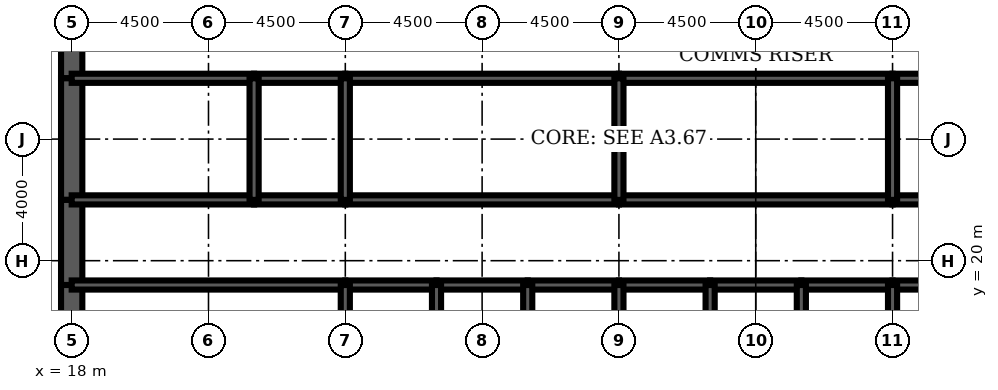
"""IFC4 building model, lengths in metres.
Left out: names, types, materials, properties, quantities, classifications, styles, units other than length and angle.
Written with IfcOpenShell. Run it as: python <this file> out.ifc"""

import sys

from ifc_helpers import new_model, si_unit, direction, frame, frame_2d, origin, place, context, subcontext, project, spatial, rectangle, extrude, element, fill, save


model = new_model("IFC4")
c1 = context("Model", 3, precision=1e-05, world=origin(), true_north=direction((0.0, 1.0)))
c2 = subcontext(c1, "Body", "Model", "MODEL_VIEW")
j1 = project(units=[si_unit("LENGTHUNIT", "METRE"), si_unit("PLANEANGLEUNIT", "RADIAN")], contexts=[c1])
p1 = place(None, origin())
s1 = spatial("IfcSite", under=j1, at=p1, CompositionType="ELEMENT")
p2 = place(p1, origin())
s2 = spatial("IfcBuilding", under=s1, at=p2, CompositionType="ELEMENT")
p3 = place(p2, frame((0.0, 0.0, 287.9)))
s3 = spatial("IfcBuildingStorey", under=s2, at=p3, CompositionType="ELEMENT", Elevation=287.9)
p4 = place(p3, frame((18.0, 28.8, 0.0), z_axis=(0.0, 0.0, 1.0), x_axis=(0.0, -1.0, 0.0)))
e1 = element("IfcWall", 1, at=p4, inside=s3, PredefinedType="SHEAR", context=c2, shape_type="SweptSolid", body=[
    extrude(rectangle(XDim=2.8, YDim=0.7, at=frame_2d((1.4, 0.0))), origin(), (0.0, 0.0, 1.0), 4.2),
])
p5 = place(p4, frame((0.4, 0.0, 0.0)))
e2 = element("IfcOpeningElement", 2, at=p5, cuts=e1, PredefinedType="OPENING", context=c2, shape_type="SweptSolid", body=[
    extrude(rectangle(XDim=1.8, YDim=2.1, at=frame_2d((0.9, 1.05))), frame((0.0, 0.36, 0.0), z_axis=(0.0, -1.0, 0.0), x_axis=(1.0, 0.0, 0.0)), (0.0, 0.0, 1.0), 0.72),
])
p6 = place(p3, frame((18.0, 26.0, 0.0), z_axis=(0.0, 0.0, 1.0), x_axis=(0.0, -1.0, 0.0)))
e3 = element("IfcWall", 3, at=p6, inside=s3, PredefinedType="SHEAR", context=c2, shape_type="SweptSolid", body=[
    extrude(rectangle(XDim=4.0, YDim=0.7, at=frame_2d((2.0, 0.0))), origin(), (0.0, 0.0, 1.0), 4.2),
])
p7 = place(p3, frame((18.0, 22.0, 0.0), z_axis=(0.0, 0.0, 1.0), x_axis=(0.0, -1.0, 0.0)))
e4 = element("IfcWall", 4, at=p7, inside=s3, PredefinedType="SHEAR", context=c2, shape_type="SweptSolid", body=[
    extrude(rectangle(XDim=2.8, YDim=0.7, at=frame_2d((1.4, 0.0))), origin(), (0.0, 0.0, 1.0), 4.2),
])
p8 = place(p7, frame((0.6, 0.0, 0.0)))
e5 = element("IfcOpeningElement", 5, at=p8, cuts=e4, PredefinedType="OPENING", context=c2, shape_type="SweptSolid", body=[
    extrude(rectangle(XDim=1.8, YDim=2.1, at=frame_2d((0.9, 1.05))), frame((0.0, 0.36, 0.0), z_axis=(0.0, -1.0, 0.0), x_axis=(1.0, 0.0, 0.0)), (0.0, 0.0, 1.0), 0.72),
])
p9 = place(p3, frame((18.0, 19.2, 0.0), z_axis=(0.0, 0.0, 1.0), x_axis=(0.0, -1.0, 0.0)))
e6 = element("IfcWall", 6, at=p9, inside=s3, PredefinedType="SHEAR", context=c2, shape_type="SweptSolid", body=[
    extrude(rectangle(XDim=3.2, YDim=0.7, at=frame_2d((1.6, 0.0))), origin(), (0.0, 0.0, 1.0), 4.2),
])
p10 = place(p3, frame((18.0, 19.2, 0.0), z_axis=(0.0, 0.0, 1.0), x_axis=(1.0, 0.0, 0.0)))
e7 = element("IfcWall", 7, at=p10, inside=s3, PredefinedType="SOLIDWALL", context=c2, shape_type="SweptSolid", body=[
    extrude(rectangle(XDim=9.0, YDim=0.3, at=frame_2d((4.5, 0.0))), origin(), (0.0, 0.0, 1.0), 4.2),
])
p11 = place(p10, frame((0.65, 0.0, 0.0)))
e8 = element("IfcOpeningElement", 8, at=p11, cuts=e7, PredefinedType="OPENING", context=c2, shape_type="SweptSolid", body=[
    extrude(rectangle(XDim=1.0, YDim=2.1, at=frame_2d((0.5, 1.05))), frame((0.0, 0.16, 0.0), z_axis=(0.0, -1.0, 0.0), x_axis=(1.0, 0.0, 0.0)), (0.0, 0.0, 1.0), 0.32),
])
p12 = place(p3, frame((27.0, 19.2, 0.0), z_axis=(0.0, 0.0, 1.0), x_axis=(1.0, 0.0, 0.0)))
e9 = element("IfcWall", 9, at=p12, inside=s3, PredefinedType="SOLIDWALL", context=c2, shape_type="SweptSolid", body=[
    extrude(rectangle(XDim=3.0, YDim=0.3, at=frame_2d((1.5, 0.0))), origin(), (0.0, 0.0, 1.0), 4.2),
])
p13 = place(p12, frame((0.95, 0.0, 0.0)))
e10 = element("IfcOpeningElement", 10, at=p13, cuts=e9, PredefinedType="OPENING", context=c2, shape_type="SweptSolid", body=[
    extrude(rectangle(XDim=1.1, YDim=2.2, at=frame_2d((0.55, 1.1))), frame((0.0, 0.16, 0.0), z_axis=(0.0, -1.0, 0.0), x_axis=(1.0, 0.0, 0.0)), (0.0, 0.0, 1.0), 0.32),
])
p14 = place(p3, frame((30.0, 19.2, 0.0), z_axis=(0.0, 0.0, 1.0), x_axis=(1.0, 0.0, 0.0)))
e11 = element("IfcWall", 11, at=p14, inside=s3, PredefinedType="SOLIDWALL", context=c2, shape_type="SweptSolid", body=[
    extrude(rectangle(XDim=3.0, YDim=0.3, at=frame_2d((1.5, 0.0))), origin(), (0.0, 0.0, 1.0), 4.2),
])
p15 = place(p14, frame((0.95, 0.0, 0.0)))
e12 = element("IfcOpeningElement", 12, at=p15, cuts=e11, PredefinedType="OPENING", context=c2, shape_type="SweptSolid", body=[
    extrude(rectangle(XDim=1.1, YDim=2.2, at=frame_2d((0.55, 1.1))), frame((0.0, 0.16, 0.0), z_axis=(0.0, -1.0, 0.0), x_axis=(1.0, 0.0, 0.0)), (0.0, 0.0, 1.0), 0.32),
])
p16 = place(p3, frame((33.0, 19.2, 0.0), z_axis=(0.0, 0.0, 1.0), x_axis=(1.0, 0.0, 0.0)))
e13 = element("IfcWall", 13, at=p16, inside=s3, PredefinedType="SOLIDWALL", context=c2, shape_type="SweptSolid", body=[
    extrude(rectangle(XDim=3.0, YDim=0.3, at=frame_2d((1.5, 0.0))), origin(), (0.0, 0.0, 1.0), 4.2),
])
p17 = place(p16, frame((0.95, 0.0, 0.0)))
e14 = element("IfcOpeningElement", 14, at=p17, cuts=e13, PredefinedType="OPENING", context=c2, shape_type="SweptSolid", body=[
    extrude(rectangle(XDim=1.1, YDim=2.2, at=frame_2d((0.55, 1.1))), frame((0.0, 0.16, 0.0), z_axis=(0.0, -1.0, 0.0), x_axis=(1.0, 0.0, 0.0)), (0.0, 0.0, 1.0), 0.32),
])
p18 = place(p3, frame((36.0, 19.2, 0.0), z_axis=(0.0, 0.0, 1.0), x_axis=(1.0, 0.0, 0.0)))
e15 = element("IfcWall", 15, at=p18, inside=s3, PredefinedType="SOLIDWALL", context=c2, shape_type="SweptSolid", body=[
    extrude(rectangle(XDim=3.0, YDim=0.3, at=frame_2d((1.5, 0.0))), origin(), (0.0, 0.0, 1.0), 4.2),
])
p19 = place(p18, frame((0.95, 0.0, 0.0)))
e16 = element("IfcOpeningElement", 16, at=p19, cuts=e15, PredefinedType="OPENING", context=c2, shape_type="SweptSolid", body=[
    extrude(rectangle(XDim=1.1, YDim=2.2, at=frame_2d((0.55, 1.1))), frame((0.0, 0.16, 0.0), z_axis=(0.0, -1.0, 0.0), x_axis=(1.0, 0.0, 0.0)), (0.0, 0.0, 1.0), 0.32),
])
p20 = place(p3, frame((39.0, 19.2, 0.0), z_axis=(0.0, 0.0, 1.0), x_axis=(1.0, 0.0, 0.0)))
e17 = element("IfcWall", 17, at=p20, inside=s3, PredefinedType="SOLIDWALL", context=c2, shape_type="SweptSolid", body=[
    extrude(rectangle(XDim=3.0, YDim=0.3, at=frame_2d((1.5, 0.0))), origin(), (0.0, 0.0, 1.0), 4.2),
])
p21 = place(p20, frame((1.0, 0.0, 0.0)))
e18 = element("IfcOpeningElement", 18, at=p21, cuts=e17, PredefinedType="OPENING", context=c2, shape_type="SweptSolid", body=[
    extrude(rectangle(XDim=1.0, YDim=2.1, at=frame_2d((0.5, 1.05))), frame((0.0, 0.16, 0.0), z_axis=(0.0, -1.0, 0.0), x_axis=(1.0, 0.0, 0.0)), (0.0, 0.0, 1.0), 0.32),
])
p22 = place(p3, frame((42.0, 19.2, 0.0), z_axis=(0.0, 0.0, 1.0), x_axis=(1.0, 0.0, 0.0)))
e19 = element("IfcWall", 19, at=p22, inside=s3, PredefinedType="SOLIDWALL", context=c2, shape_type="SweptSolid", body=[
    extrude(rectangle(XDim=3.0, YDim=0.3, at=frame_2d((1.5, 0.0))), origin(), (0.0, 0.0, 1.0), 4.2),
])
p23 = place(p22, frame((1.0, 0.0, 0.0)))
e20 = element("IfcOpeningElement", 20, at=p23, cuts=e19, PredefinedType="OPENING", context=c2, shape_type="SweptSolid", body=[
    extrude(rectangle(XDim=1.0, YDim=2.1, at=frame_2d((0.5, 1.05))), frame((0.0, 0.16, 0.0), z_axis=(0.0, -1.0, 0.0), x_axis=(1.0, 0.0, 0.0)), (0.0, 0.0, 1.0), 0.32),
])
p24 = place(p3, frame((45.0, 19.2, 0.0), z_axis=(0.0, 0.0, 1.0), x_axis=(1.0, 0.0, 0.0)))
e21 = element("IfcWall", 21, at=p24, inside=s3, PredefinedType="SOLIDWALL", context=c2, shape_type="SweptSolid", body=[
    extrude(rectangle(XDim=9.0, YDim=0.3, at=frame_2d((4.5, 0.0))), origin(), (0.0, 0.0, 1.0), 4.2),
])
p25 = place(p24, frame((7.35, 0.0, 0.0)))
e22 = element("IfcOpeningElement", 22, at=p25, cuts=e21, PredefinedType="OPENING", context=c2, shape_type="SweptSolid", body=[
    extrude(rectangle(XDim=1.0, YDim=2.1, at=frame_2d((0.5, 1.05))), frame((0.0, 0.16, 0.0), z_axis=(0.0, -1.0, 0.0), x_axis=(1.0, 0.0, 0.0)), (0.0, 0.0, 1.0), 0.32),
])
p26 = place(p3, frame((18.0, 22.0, 0.0), z_axis=(0.0, 0.0, 1.0), x_axis=(1.0, 0.0, 0.0)))
e23 = element("IfcWall", 23, at=p26, inside=s3, PredefinedType="SOLIDWALL", context=c2, shape_type="SweptSolid", body=[
    extrude(rectangle(XDim=6.0, YDim=0.3, at=frame_2d((3.0, 0.0))), origin(), (0.0, 0.0, 1.0), 4.2),
])
p27 = place(p26, frame((4.4, 0.0, 0.0)))
e24 = element("IfcOpeningElement", 24, at=p27, cuts=e23, PredefinedType="OPENING", context=c2, shape_type="SweptSolid", body=[
    extrude(rectangle(XDim=1.0, YDim=2.1, at=frame_2d((0.5, 1.05))), frame((0.0, 0.16, 0.0), z_axis=(0.0, -1.0, 0.0), x_axis=(1.0, 0.0, 0.0)), (0.0, 0.0, 1.0), 0.32),
])
p28 = place(p26, frame((0.75, 0.0, 0.0)))
e25 = element("IfcOpeningElement", 25, at=p28, cuts=e23, PredefinedType="OPENING", context=c2, shape_type="SweptSolid", body=[
    extrude(rectangle(XDim=1.0, YDim=2.1, at=frame_2d((0.5, 1.05))), frame((0.0, 0.16, 0.0), z_axis=(0.0, -1.0, 0.0), x_axis=(1.0, 0.0, 0.0)), (0.0, 0.0, 1.0), 0.32),
])
p29 = place(p3, frame((24.0, 22.0, 0.0), z_axis=(0.0, 0.0, 1.0), x_axis=(1.0, 0.0, 0.0)))
e26 = element("IfcWall", 26, at=p29, inside=s3, PredefinedType="SOLIDWALL", context=c2, shape_type="SweptSolid", body=[
    extrude(rectangle(XDim=3.0, YDim=0.3, at=frame_2d((1.5, 0.0))), origin(), (0.0, 0.0, 1.0), 4.2),
])
p30 = place(p29, frame((1.0, 0.0, 0.0)))
e27 = element("IfcOpeningElement", 27, at=p30, cuts=e26, PredefinedType="OPENING", context=c2, shape_type="SweptSolid", body=[
    extrude(rectangle(XDim=1.0, YDim=2.1, at=frame_2d((0.5, 1.05))), frame((0.0, 0.16, 0.0), z_axis=(0.0, -1.0, 0.0), x_axis=(1.0, 0.0, 0.0)), (0.0, 0.0, 1.0), 0.32),
])
p31 = place(p3, frame((27.0, 22.0, 0.0), z_axis=(0.0, 0.0, 1.0), x_axis=(1.0, 0.0, 0.0)))
e28 = element("IfcWall", 28, at=p31, inside=s3, PredefinedType="SOLIDWALL", context=c2, shape_type="SweptSolid", body=[
    extrude(rectangle(XDim=9.0, YDim=0.3, at=frame_2d((4.5, 0.0))), origin(), (0.0, 0.0, 1.0), 4.2),
])
p32 = place(p31, frame((4.0, 0.0, 0.0)))
e29 = element("IfcOpeningElement", 29, at=p32, cuts=e28, PredefinedType="OPENING", context=c2, shape_type="SweptSolid", body=[
    extrude(rectangle(XDim=1.0, YDim=2.1, at=frame_2d((0.5, 1.05))), frame((0.0, 0.16, 0.0), z_axis=(0.0, -1.0, 0.0), x_axis=(1.0, 0.0, 0.0)), (0.0, 0.0, 1.0), 0.32),
])
p33 = place(p3, frame((36.0, 22.0, 0.0), z_axis=(0.0, 0.0, 1.0), x_axis=(1.0, 0.0, 0.0)))
e30 = element("IfcWall", 30, at=p33, inside=s3, PredefinedType="SOLIDWALL", context=c2, shape_type="SweptSolid", body=[
    extrude(rectangle(XDim=9.0, YDim=0.3, at=frame_2d((4.5, 0.0))), origin(), (0.0, 0.0, 1.0), 4.2),
])
p34 = place(p33, frame((4.0, 0.0, 0.0)))
e31 = element("IfcOpeningElement", 31, at=p34, cuts=e30, PredefinedType="OPENING", context=c2, shape_type="SweptSolid", body=[
    extrude(rectangle(XDim=1.0, YDim=2.1, at=frame_2d((0.5, 1.05))), frame((0.0, 0.16, 0.0), z_axis=(0.0, -1.0, 0.0), x_axis=(1.0, 0.0, 0.0)), (0.0, 0.0, 1.0), 0.32),
])
p35 = place(p3, frame((45.0, 22.0, 0.0), z_axis=(0.0, 0.0, 1.0), x_axis=(1.0, 0.0, 0.0)))
e32 = element("IfcWall", 32, at=p35, inside=s3, PredefinedType="SOLIDWALL", context=c2, shape_type="SweptSolid", body=[
    extrude(rectangle(XDim=3.0, YDim=0.3, at=frame_2d((1.5, 0.0))), origin(), (0.0, 0.0, 1.0), 4.2),
])
p36 = place(p35, frame((1.0, 0.0, 0.0)))
e33 = element("IfcOpeningElement", 33, at=p36, cuts=e32, PredefinedType="OPENING", context=c2, shape_type="SweptSolid", body=[
    extrude(rectangle(XDim=1.0, YDim=2.1, at=frame_2d((0.5, 1.05))), frame((0.0, 0.16, 0.0), z_axis=(0.0, -1.0, 0.0), x_axis=(1.0, 0.0, 0.0)), (0.0, 0.0, 1.0), 0.32),
])
p37 = place(p3, frame((18.0, 26.0, 0.0), z_axis=(0.0, 0.0, 1.0), x_axis=(1.0, 0.0, 0.0)))
e34 = element("IfcWall", 34, at=p37, inside=s3, PredefinedType="SOLIDWALL", context=c2, shape_type="SweptSolid", body=[
    extrude(rectangle(XDim=6.0, YDim=0.3, at=frame_2d((3.0, 0.0))), origin(), (0.0, 0.0, 1.0), 4.2),
])
p38 = place(p3, frame((24.0, 26.0, 0.0), z_axis=(0.0, 0.0, 1.0), x_axis=(1.0, 0.0, 0.0)))
e35 = element("IfcWall", 35, at=p38, inside=s3, PredefinedType="SOLIDWALL", context=c2, shape_type="SweptSolid", body=[
    extrude(rectangle(XDim=3.0, YDim=0.3, at=frame_2d((1.5, 0.0))), origin(), (0.0, 0.0, 1.0), 4.2),
])
for number, where, z_axis, x_axis in (
    (36, (27.0, 26.0, 0.0), (0.0, 0.0, 1.0), (1.0, 0.0, 0.0)),
    (37, (36.0, 26.0, 0.0), (0.0, 0.0, 1.0), (1.0, 0.0, 0.0)),
):
    element("IfcWall", number, at=place(p3, frame(where, z_axis=z_axis, x_axis=x_axis)), inside=s3, PredefinedType="SOLIDWALL", context=c2, shape_type="SweptSolid", body=[
        extrude(rectangle(XDim=9.0, YDim=0.3, at=frame_2d((4.5, 0.0))), origin(), (0.0, 0.0, 1.0), 4.2),
    ])
p39 = place(p3, frame((45.0, 26.0, 0.0), z_axis=(0.0, 0.0, 1.0), x_axis=(1.0, 0.0, 0.0)))
e38 = element("IfcWall", 38, at=p39, inside=s3, PredefinedType="SOLIDWALL", context=c2, shape_type="SweptSolid", body=[
    extrude(rectangle(XDim=3.0, YDim=0.3, at=frame_2d((1.5, 0.0))), origin(), (0.0, 0.0, 1.0), 4.2),
])
for number, where, z_axis, x_axis in (
    (39, (27.0, 16.0, 0.0), (0.0, 0.0, 1.0), (0.0, 1.0, 0.0)),
    (40, (30.0, 16.0, 0.0), (0.0, 0.0, 1.0), (0.0, 1.0, 0.0)),
    (41, (33.0, 16.0, 0.0), (0.0, 0.0, 1.0), (0.0, 1.0, 0.0)),
    (42, (36.0, 16.0, 0.0), (0.0, 0.0, 1.0), (0.0, 1.0, 0.0)),
    (43, (39.0, 16.0, 0.0), (0.0, 0.0, 1.0), (0.0, 1.0, 0.0)),
    (44, (42.0, 16.0, 0.0), (0.0, 0.0, 1.0), (0.0, 1.0, 0.0)),
    (45, (45.0, 16.0, 0.0), (0.0, 0.0, 1.0), (0.0, 1.0, 0.0)),
):
    element("IfcWall", number, at=place(p3, frame(where, z_axis=z_axis, x_axis=x_axis)), inside=s3, PredefinedType="SOLIDWALL", context=c2, shape_type="SweptSolid", body=[
        extrude(rectangle(XDim=3.2, YDim=0.3, at=frame_2d((1.6, 0.0))), origin(), (0.0, 0.0, 1.0), 4.2),
    ])
for number, where, z_axis, x_axis in (
    (46, (24.0, 22.0, 0.0), (0.0, 0.0, 1.0), (0.0, 1.0, 0.0)),
    (47, (27.0, 22.0, 0.0), (0.0, 0.0, 1.0), (0.0, 1.0, 0.0)),
    (48, (36.0, 22.0, 0.0), (0.0, 0.0, 1.0), (0.0, 1.0, 0.0)),
    (49, (45.0, 22.0, 0.0), (0.0, 0.0, 1.0), (0.0, 1.0, 0.0)),
):
    element("IfcWall", number, at=place(p3, frame(where, z_axis=z_axis, x_axis=x_axis)), inside=s3, PredefinedType="SOLIDWALL", context=c2, shape_type="SweptSolid", body=[
        extrude(rectangle(XDim=4.0, YDim=0.3, at=frame_2d((2.0, 0.0))), origin(), (0.0, 0.0, 1.0), 4.2),
    ])
p40 = place(p3, frame((20.225, 22.15, 0.0), z_axis=(0.0, 0.0, 1.0), x_axis=(0.0, 1.0, 0.0)))
e50 = element("IfcWall", 50, at=p40, inside=s3, PredefinedType="PARTITIONING", context=c2, shape_type="SweptSolid", body=[
    extrude(rectangle(XDim=3.7, YDim=0.15, at=frame_2d((1.85, 0.0))), origin(), (0.0, 0.0, 1.0), 3.0),
])
p41 = place(p3, frame((24.5, 19.35, 0.0), z_axis=(0.0, 0.0, 1.0), x_axis=(0.0, 1.0, 0.0)))
e51 = element("IfcWall", 51, at=p41, inside=s3, PredefinedType="PARTITIONING", context=c2, shape_type="SweptSolid", body=[
    extrude(rectangle(XDim=2.5, YDim=0.15, at=frame_2d((1.25, 0.0))), origin(), (0.0, 0.0, 1.0), 3.0),
])
p42 = place(p41, frame((1.15, 0.0, 0.0)))
e52 = element("IfcOpeningElement", 52, at=p42, cuts=e51, PredefinedType="OPENING", context=c2, shape_type="SweptSolid", body=[
    extrude(rectangle(XDim=1.0, YDim=2.1, at=frame_2d((0.5, 1.05))), frame((0.0, 0.085, 0.0), z_axis=(0.0, -1.0, 0.0), x_axis=(1.0, 0.0, 0.0)), (0.0, 0.0, 1.0), 0.17),
])
p43 = place(p42, origin())
e53 = element("IfcDoor", 53, at=p43, inside=s3, OperationType="SINGLE_SWING_RIGHT", PredefinedType="DOOR", context=c2, shape_type="SweptSolid", body=[
    extrude(rectangle(XDim=1.0, YDim=2.1, at=frame_2d((0.5, 1.05))), frame((0.0, 0.025, 0.0), z_axis=(0.0, -1.0, 0.0), x_axis=(1.0, 0.0, 0.0)), (0.0, 0.0, 1.0), 0.05),
])
fill(e52, e53)
p44 = place(p13, origin())
e54 = element("IfcDoor", 54, at=p44, inside=s3, OperationType="DOUBLE_DOOR_SLIDING", PredefinedType="USERDEFINED", context=c2, shape_type="SweptSolid", body=[
    extrude(rectangle(XDim=1.1, YDim=2.2, at=frame_2d((0.55, 1.1))), frame((0.0, 0.025, 0.0), z_axis=(0.0, -1.0, 0.0), x_axis=(1.0, 0.0, 0.0)), (0.0, 0.0, 1.0), 0.05),
])
fill(e10, e54)
p45 = place(p15, origin())
e55 = element("IfcDoor", 55, at=p45, inside=s3, OperationType="DOUBLE_DOOR_SLIDING", PredefinedType="USERDEFINED", context=c2, shape_type="SweptSolid", body=[
    extrude(rectangle(XDim=1.1, YDim=2.2, at=frame_2d((0.55, 1.1))), frame((0.0, 0.025, 0.0), z_axis=(0.0, -1.0, 0.0), x_axis=(1.0, 0.0, 0.0)), (0.0, 0.0, 1.0), 0.05),
])
fill(e12, e55)
p46 = place(p17, origin())
e56 = element("IfcDoor", 56, at=p46, inside=s3, OperationType="DOUBLE_DOOR_SLIDING", PredefinedType="USERDEFINED", context=c2, shape_type="SweptSolid", body=[
    extrude(rectangle(XDim=1.1, YDim=2.2, at=frame_2d((0.55, 1.1))), frame((0.0, 0.025, 0.0), z_axis=(0.0, -1.0, 0.0), x_axis=(1.0, 0.0, 0.0)), (0.0, 0.0, 1.0), 0.05),
])
fill(e14, e56)
p47 = place(p19, origin())
e57 = element("IfcDoor", 57, at=p47, inside=s3, OperationType="DOUBLE_DOOR_SLIDING", PredefinedType="USERDEFINED", context=c2, shape_type="SweptSolid", body=[
    extrude(rectangle(XDim=1.1, YDim=2.2, at=frame_2d((0.55, 1.1))), frame((0.0, 0.025, 0.0), z_axis=(0.0, -1.0, 0.0), x_axis=(1.0, 0.0, 0.0)), (0.0, 0.0, 1.0), 0.05),
])
fill(e16, e57)
p48 = place(p11, origin())
e58 = element("IfcDoor", 58, at=p48, inside=s3, OperationType="SINGLE_SWING_LEFT", PredefinedType="DOOR", context=c2, shape_type="SweptSolid", body=[
    extrude(rectangle(XDim=1.0, YDim=2.1, at=frame_2d((0.5, 1.05))), frame((0.0, 0.025, 0.0), z_axis=(0.0, -1.0, 0.0), x_axis=(1.0, 0.0, 0.0)), (0.0, 0.0, 1.0), 0.05),
])
fill(e8, e58)
p49 = place(p8, origin())
e59 = element("IfcDoor", 59, at=p49, inside=s3, OperationType="SINGLE_SWING_LEFT", PredefinedType="DOOR", context=c2, shape_type="SweptSolid", body=[
    extrude(rectangle(XDim=1.8, YDim=2.1, at=frame_2d((0.9, 1.05))), frame((0.0, 0.35, 0.0), z_axis=(0.0, -1.0, 0.0), x_axis=(1.0, 0.0, 0.0)), (0.0, 0.0, 1.0), 0.699),
])
fill(e5, e59)
p50 = place(p5, origin())
e60 = element("IfcDoor", 60, at=p50, inside=s3, OperationType="SINGLE_SWING_LEFT", PredefinedType="DOOR", context=c2, shape_type="SweptSolid", body=[
    extrude(rectangle(XDim=1.8, YDim=2.1, at=frame_2d((0.9, 1.05))), frame((0.0, 0.35, 0.0), z_axis=(0.0, -1.0, 0.0), x_axis=(1.0, 0.0, 0.0)), (0.0, 0.0, 1.0), 0.699),
])
fill(e2, e60)
p51 = place(p27, origin())
e61 = element("IfcDoor", 61, at=p51, inside=s3, OperationType="SINGLE_SWING_RIGHT", PredefinedType="DOOR", context=c2, shape_type="SweptSolid", body=[
    extrude(rectangle(XDim=1.0, YDim=2.1, at=frame_2d((0.5, 1.05))), frame((0.0, 0.025, 0.0), z_axis=(0.0, -1.0, 0.0), x_axis=(1.0, 0.0, 0.0)), (0.0, 0.0, 1.0), 0.05),
])
fill(e24, e61)
p52 = place(p30, origin())
e62 = element("IfcDoor", 62, at=p52, inside=s3, OperationType="SINGLE_SWING_LEFT", PredefinedType="DOOR", context=c2, shape_type="SweptSolid", body=[
    extrude(rectangle(XDim=1.0, YDim=2.1, at=frame_2d((0.5, 1.05))), frame((0.0, 0.025, 0.0), z_axis=(0.0, -1.0, 0.0), x_axis=(1.0, 0.0, 0.0)), (0.0, 0.0, 1.0), 0.05),
])
fill(e27, e62)
p53 = place(p32, origin())
e63 = element("IfcDoor", 63, at=p53, inside=s3, OperationType="SINGLE_SWING_LEFT", PredefinedType="DOOR", context=c2, shape_type="SweptSolid", body=[
    extrude(rectangle(XDim=1.0, YDim=2.1, at=frame_2d((0.5, 1.05))), frame((0.0, 0.025, 0.0), z_axis=(0.0, -1.0, 0.0), x_axis=(1.0, 0.0, 0.0)), (0.0, 0.0, 1.0), 0.05),
])
fill(e29, e63)
p54 = place(p34, origin())
e64 = element("IfcDoor", 64, at=p54, inside=s3, OperationType="SINGLE_SWING_LEFT", PredefinedType="DOOR", context=c2, shape_type="SweptSolid", body=[
    extrude(rectangle(XDim=1.0, YDim=2.1, at=frame_2d((0.5, 1.05))), frame((0.0, 0.025, 0.0), z_axis=(0.0, -1.0, 0.0), x_axis=(1.0, 0.0, 0.0)), (0.0, 0.0, 1.0), 0.05),
])
fill(e31, e64)
p55 = place(p28, origin())
e65 = element("IfcDoor", 65, at=p55, inside=s3, OperationType="SINGLE_SWING_LEFT", PredefinedType="DOOR", context=c2, shape_type="SweptSolid", body=[
    extrude(rectangle(XDim=1.0, YDim=2.1, at=frame_2d((0.5, 1.05))), frame((0.0, 0.025, 0.0), z_axis=(0.0, -1.0, 0.0), x_axis=(1.0, 0.0, 0.0)), (0.0, 0.0, 1.0), 0.05),
])
fill(e25, e65)
p56 = place(p21, origin())
e66 = element("IfcDoor", 66, at=p56, inside=s3, OperationType="SINGLE_SWING_LEFT", PredefinedType="DOOR", context=c2, shape_type="SweptSolid", body=[
    extrude(rectangle(XDim=1.0, YDim=2.1, at=frame_2d((0.5, 1.05))), frame((0.0, 0.025, 0.0), z_axis=(0.0, -1.0, 0.0), x_axis=(1.0, 0.0, 0.0)), (0.0, 0.0, 1.0), 0.05),
])
fill(e18, e66)
p57 = place(p23, origin())
e67 = element("IfcDoor", 67, at=p57, inside=s3, OperationType="SINGLE_SWING_LEFT", PredefinedType="DOOR", context=c2, shape_type="SweptSolid", body=[
    extrude(rectangle(XDim=1.0, YDim=2.1, at=frame_2d((0.5, 1.05))), frame((0.0, 0.025, 0.0), z_axis=(0.0, -1.0, 0.0), x_axis=(1.0, 0.0, 0.0)), (0.0, 0.0, 1.0), 0.05),
])
fill(e20, e67)
save(model, sys.argv[1])
